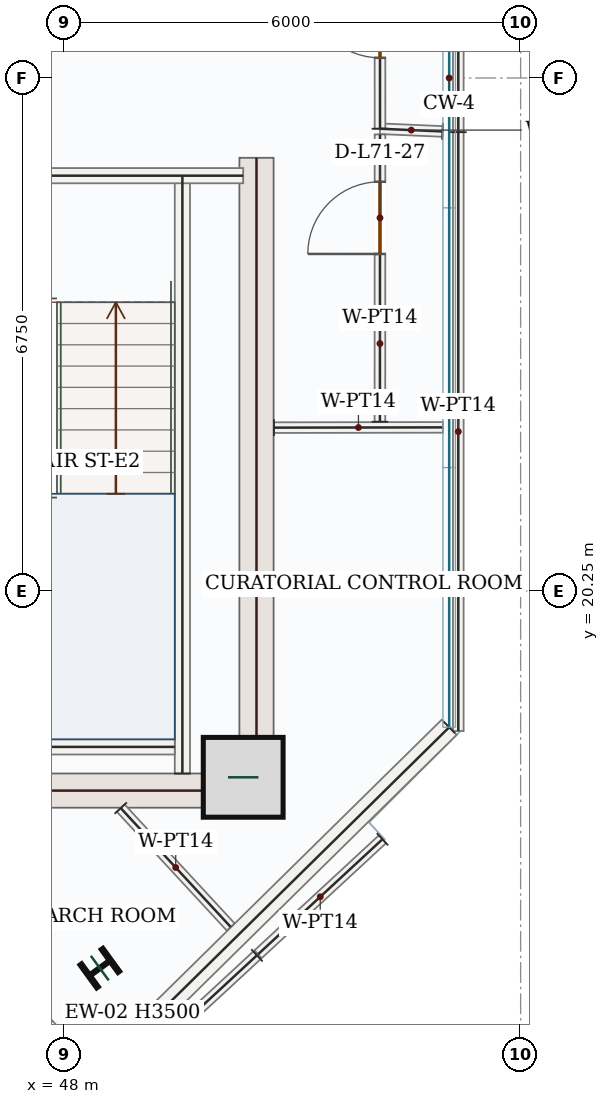
"""IFC4 building model, lengths in metres.
Left out: names, types, materials, properties, quantities, classifications, styles, units other than length and angle.
Written with IfcOpenShell. Run it as: python <this file> out.ifc"""

import sys

from ifc_helpers import new_model, si_unit, direction, frame, frame_2d, origin, origin_2d, place, context, subcontext, project, spatial, rectangle, i_section, extrude, source, transform, mapped, element, fill, save


model = new_model("IFC4")
c1 = context("Model", 3, precision=1e-05, world=origin(), true_north=direction((0.0, 1.0)))
c2 = subcontext(c1, "Body", "Model", "MODEL_VIEW")
j1 = project(units=[si_unit("LENGTHUNIT", "METRE"), si_unit("PLANEANGLEUNIT", "RADIAN")], contexts=[c1])
p1 = place(None, origin())
s1 = spatial("IfcSite", under=j1, at=p1, CompositionType="ELEMENT")
p2 = place(p1, origin())
s2 = spatial("IfcBuilding", under=s1, at=p2, CompositionType="ELEMENT")
p3 = place(p2, frame((0.0, 0.0, 295.35)))
s3 = spatial("IfcBuildingStorey", under=s2, at=p3, CompositionType="ELEMENT", Elevation=295.35)
m1 = source(origin(), c2, "Body", "SweptSolid", [
    extrude(rectangle(XDim=8.55, YDim=0.45, at=frame_2d((4.275, 0.0))), origin(), (0.0, 0.0, 1.0), 3.5),
])
p4 = place(p3, frame((50.525, 17.4, 0.0), z_axis=(0.0, 0.0, 1.0), x_axis=(0.0, 1.0, 0.0)))
e1 = element("IfcWall", 1, at=p4, inside=s3, PredefinedType="SHEAR", context=c2, shape_type="MappedRepresentation", body=[
    mapped(m1, transform((0.0, 0.0, 0.0), x_axis=(1.0, 0.0, 0.0), y_axis=(0.0, 1.0, 0.0), z_axis=(0.0, 0.0, 1.0), scale=1.0)),
])
m2 = source(origin(), c2, "Body", "SweptSolid", [
    extrude(rectangle(XDim=7.1, YDim=0.45, at=frame_2d((3.55, 0.0))), origin(), (0.0, 0.0, 1.0), 3.5),
])
p5 = place(p3, frame((43.2, 17.625, 0.0), z_axis=(0.0, 0.0, 1.0), x_axis=(1.0, 0.0, 0.0)))
e2 = element("IfcWall", 2, at=p5, inside=s3, PredefinedType="SHEAR", context=c2, shape_type="MappedRepresentation", body=[
    mapped(m2, transform((0.0, 0.0, 0.0), x_axis=(1.0, 0.0, 0.0), y_axis=(0.0, 1.0, 0.0), z_axis=(0.0, 0.0, 1.0), scale=1.0)),
])
m3 = source(origin(), c2, "Body", "SweptSolid", [
    extrude(rectangle(XDim=1.05, YDim=1.05, at=origin_2d()), origin(), (0.0, 0.0, 1.0), 3.75),
])
p6 = place(p3, frame((50.35, 17.8, 0.0), z_axis=(0.0, 0.0, 1.0), x_axis=(1.0, 0.0, 0.0)))
e3 = element("IfcColumn", 3, at=p6, inside=s3, PredefinedType="COLUMN", context=c2, shape_type="MappedRepresentation", body=[
    mapped(m3, transform((0.0, 0.0, 0.0), x_axis=(1.0, 0.0, 0.0), y_axis=(0.0, 1.0, 0.0), z_axis=(0.0, 0.0, 1.0), scale=1.0)),
])
m4 = source(origin(), c2, "Body", "SweptSolid", [
    extrude(i_section(OverallWidth=0.374, OverallDepth=0.372, WebThickness=0.016, FlangeThickness=0.026, FilletRadius=0.018, at=origin_2d()), origin(), (0.0, 0.0, 1.0), 3.75),
])
p7 = place(p3, frame((48.464, 15.289, 0.0), z_axis=(0.0, 0.0, 1.0), x_axis=(-0.587785252292, 0.809016994375, 0.0)))
e4 = element("IfcColumn", 4, at=p7, inside=s3, PredefinedType="COLUMN", context=c2, shape_type="MappedRepresentation", body=[
    mapped(m4, transform((0.0, 0.0, 0.0), x_axis=(1.0, 0.0, 0.0), y_axis=(0.0, 1.0, 0.0), z_axis=(0.0, 0.0, 1.0), scale=1.0)),
])
m5 = source(origin(), c2, "Body", "SweptSolid", [
    extrude(rectangle(XDim=11.69, YDim=0.28, at=frame_2d((5.845, 0.0))), origin(), (0.0, 0.0, 1.0), 3.5),
])
p8 = place(p3, frame((53.06, 18.458, 0.0), z_axis=(0.0, 0.0, 1.0), x_axis=(-0.712557502542, -0.701613715353, 0.0)))
e5 = element("IfcWall", 5, at=p8, inside=s3, PredefinedType="SOLIDWALL", context=c2, shape_type="MappedRepresentation", body=[
    mapped(m5, transform((0.0, 0.0, 0.0), x_axis=(1.0, 0.0, 0.0), y_axis=(0.0, 1.0, 0.0), z_axis=(0.0, 0.0, 1.0), scale=1.0)),
])
m6 = source(origin(), c2, "Body", "SweptSolid", [
    extrude(rectangle(XDim=7.87, YDim=0.2, at=frame_2d((3.935, 0.0))), origin(), (0.0, 0.0, 1.0), 3.5),
])
p9 = place(p3, frame((49.55, 17.85, 0.0), z_axis=(0.0, 0.0, 1.0), x_axis=(0.0, 1.0, 0.0)))
e6 = element("IfcWall", 6, at=p9, inside=s3, PredefinedType="SOLIDWALL", context=c2, shape_type="MappedRepresentation", body=[
    mapped(m6, transform((0.0, 0.0, 0.0), x_axis=(1.0, 0.0, 0.0), y_axis=(0.0, 1.0, 0.0), z_axis=(0.0, 0.0, 1.0), scale=1.0)),
])
m7 = source(origin(), c2, "Body", "SweptSolid", [
    extrude(rectangle(XDim=4.25, YDim=0.2, at=frame_2d((2.125, 0.0))), origin(), (0.0, 0.0, 1.0), 3.5),
])
p10 = place(p3, frame((46.1, 25.715, 0.0), z_axis=(0.0, 0.0, 1.0), x_axis=(1.0, 0.0, 0.0)))
e7 = element("IfcWall", 7, at=p10, inside=s3, PredefinedType="SOLIDWALL", context=c2, shape_type="MappedRepresentation", body=[
    mapped(m7, transform((0.0, 0.0, 0.0), x_axis=(1.0, 0.0, 0.0), y_axis=(0.0, 1.0, 0.0), z_axis=(0.0, 0.0, 1.0), scale=1.0)),
])
m8 = source(origin(), c2, "Body", "SweptSolid", [
    extrude(rectangle(XDim=3.25, YDim=0.2, at=frame_2d((1.625, 0.0))), origin(), (0.0, 0.0, 1.0), 3.5),
])
p11 = place(p3, frame((46.2, 18.2, 0.0), z_axis=(0.0, 0.0, 1.0), x_axis=(1.0, 0.0, 0.0)))
e8 = element("IfcWall", 8, at=p11, inside=s3, PredefinedType="SOLIDWALL", context=c2, shape_type="MappedRepresentation", body=[
    mapped(m8, transform((0.0, 0.0, 0.0), x_axis=(1.0, 0.0, 0.0), y_axis=(0.0, 1.0, 0.0), z_axis=(0.0, 0.0, 1.0), scale=1.0)),
])
p12 = place(p3, frame((48.311, 13.985, 0.0), z_axis=(0.0, 0.0, 1.0), x_axis=(-0.679002327249, 0.73413611789, 0.0)))
e9 = element("IfcWall", 9, at=p12, inside=s3, PredefinedType="PARTITIONING", context=c2, shape_type="SweptSolid", body=[
    extrude(rectangle(XDim=4.645, YDim=0.14, at=frame_2d((2.323, 0.0))), origin(), (0.0, 0.0, 1.0), 3.5),
])
p13 = place(p12, frame((2.882, 0.0, 0.0)))
e10 = element("IfcOpeningElement", 10, at=p13, cuts=e9, PredefinedType="OPENING", context=c2, shape_type="SweptSolid", body=[
    extrude(rectangle(XDim=0.95, YDim=2.15, at=frame_2d((0.475, 1.075))), frame((0.0, 0.08, 0.0), z_axis=(0.0, -1.0, 0.0), x_axis=(1.0, 0.0, 0.0)), (0.0, 0.0, 1.0), 0.16),
])
m9 = source(origin(), c2, "Body", "SweptSolid", [
    extrude(rectangle(XDim=2.13, YDim=0.14, at=frame_2d((1.065, 0.0))), origin(), (0.0, 0.0, 1.0), 3.5),
])
p14 = place(p3, frame((48.739, 17.395, 0.0), z_axis=(0.0, 0.0, 1.0), x_axis=(0.678946242809, -0.734187986401, 0.0)))
e11 = element("IfcWall", 11, at=p14, inside=s3, PredefinedType="PARTITIONING", context=c2, shape_type="MappedRepresentation", body=[
    mapped(m9, transform((0.0, 0.0, 0.0), x_axis=(1.0, 0.0, 0.0), y_axis=(0.0, 1.0, 0.0), z_axis=(0.0, 0.0, 1.0), scale=1.0)),
])
m10 = source(origin(), c2, "Body", "SweptSolid", [
    extrude(rectangle(XDim=2.63, YDim=0.14, at=frame_2d((1.315, 0.0))), origin(), (0.0, 0.0, 1.0), 3.5),
])
p15 = place(p3, frame((50.531, 15.458, 0.0), z_axis=(0.0, 0.0, 1.0), x_axis=(-0.73409481217, -0.679046984196, 0.0)))
e12 = element("IfcWall", 12, at=p15, inside=s3, PredefinedType="PARTITIONING", context=c2, shape_type="MappedRepresentation", body=[
    mapped(m10, transform((0.0, 0.0, 0.0), x_axis=(1.0, 0.0, 0.0), y_axis=(0.0, 1.0, 0.0), z_axis=(0.0, 0.0, 1.0), scale=1.0)),
])
m11 = source(origin(), c2, "Body", "SweptSolid", [
    extrude(rectangle(XDim=9.304, YDim=0.14, at=frame_2d((4.652, 0.0))), origin(), (0.0, 0.0, 1.0), 3.5),
])
p16 = place(p3, frame((53.18, 35.592, 0.0), z_axis=(0.0, 0.0, 1.0), x_axis=(0.0, -1.0, 0.0)))
e13 = element("IfcWall", 13, at=p16, inside=s3, PredefinedType="PARTITIONING", context=c2, shape_type="MappedRepresentation", body=[
    mapped(m11, transform((0.0, 0.0, 0.0), x_axis=(1.0, 0.0, 0.0), y_axis=(0.0, 1.0, 0.0), z_axis=(0.0, 0.0, 1.0), scale=1.0)),
])
m12 = source(origin(), c2, "Body", "SweptSolid", [
    extrude(rectangle(XDim=0.823, YDim=0.14, at=frame_2d((0.412, 0.0))), origin(), (0.0, 0.0, 1.0), 3.5),
])
p17 = place(p3, frame((52.972, 26.297, 0.0), z_axis=(0.0, 0.0, 1.0), x_axis=(-0.999049432265, 0.043591649315, 0.0)))
e14 = element("IfcWall", 14, at=p17, inside=s3, PredefinedType="PARTITIONING", context=c2, shape_type="MappedRepresentation", body=[
    mapped(m12, transform((0.0, 0.0, 0.0), x_axis=(1.0, 0.0, 0.0), y_axis=(0.0, 1.0, 0.0), z_axis=(0.0, 0.0, 1.0), scale=1.0)),
])
p18 = place(p3, frame((52.15, 26.333, 0.0), z_axis=(0.0, 0.0, 1.0), x_axis=(-0.000188111359, 0.999999982307, 0.0)))
e15 = element("IfcWall", 15, at=p18, inside=s3, PredefinedType="PARTITIONING", context=c2, shape_type="SweptSolid", body=[
    extrude(rectangle(XDim=5.191, YDim=0.14, at=frame_2d((2.596, 0.0))), origin(), (0.0, 0.0, 1.0), 3.5),
])
p19 = place(p18, frame((0.933, 0.0, 0.0)))
e16 = element("IfcOpeningElement", 16, at=p19, cuts=e15, PredefinedType="OPENING", context=c2, shape_type="SweptSolid", body=[
    extrude(rectangle(XDim=0.95, YDim=2.15, at=frame_2d((0.475, 1.075))), frame((0.0, 0.08, 0.0), z_axis=(0.0, -1.0, 0.0), x_axis=(1.0, 0.0, 0.0)), (0.0, 0.0, 1.0), 0.16),
])
m13 = source(origin(), c2, "Body", "SweptSolid", [
    extrude(rectangle(XDim=2.223, YDim=0.14, at=frame_2d((1.111, 0.0))), origin(), (0.0, 0.0, 1.0), 3.5),
])
p20 = place(p3, frame((50.755, 22.4, 0.0), z_axis=(0.0, 0.0, 1.0), x_axis=(0.99999881761, 0.00153778377, 0.0)))
e17 = element("IfcWall", 17, at=p20, inside=s3, PredefinedType="PARTITIONING", context=c2, shape_type="MappedRepresentation", body=[
    mapped(m13, transform((0.0, 0.0, 0.0), x_axis=(1.0, 0.0, 0.0), y_axis=(0.0, 1.0, 0.0), z_axis=(0.0, 0.0, 1.0), scale=1.0)),
])
p21 = place(p3, frame((52.149, 22.477, 0.0), z_axis=(0.0, 0.0, 1.0), x_axis=(0.000322913959, 0.999999947863, 0.0)))
e18 = element("IfcWall", 18, at=p21, inside=s3, PredefinedType="PARTITIONING", context=c2, shape_type="SweptSolid", body=[
    extrude(rectangle(XDim=3.78, YDim=0.14, at=frame_2d((1.89, 0.0))), origin(), (0.0, 0.0, 1.0), 3.5),
])
p22 = place(p21, frame((2.208, 0.0, 0.0)))
e19 = element("IfcOpeningElement", 19, at=p22, cuts=e18, PredefinedType="OPENING", context=c2, shape_type="SweptSolid", body=[
    extrude(rectangle(XDim=0.95, YDim=2.15, at=frame_2d((0.475, 1.075))), frame((0.0, 0.08, 0.0), z_axis=(0.0, -1.0, 0.0), x_axis=(1.0, 0.0, 0.0)), (0.0, 0.0, 1.0), 0.16),
])
m14 = source(origin(), c2, "Body", "SweptSolid", [
    extrude(rectangle(XDim=7.879, YDim=0.14, at=frame_2d((3.94, 0.0))), origin(), (0.0, 0.0, 1.0), 3.5),
])
p23 = place(p3, frame((53.18, 26.288, 0.0), z_axis=(0.0, 0.0, 1.0), x_axis=(0.0, -1.0, 0.0)))
e20 = element("IfcWall", 20, at=p23, inside=s3, PredefinedType="PARTITIONING", context=c2, shape_type="MappedRepresentation", body=[
    mapped(m14, transform((0.0, 0.0, 0.0), x_axis=(1.0, 0.0, 0.0), y_axis=(0.0, 1.0, 0.0), z_axis=(0.0, 0.0, 1.0), scale=1.0)),
])
m15 = source(origin(), c2, "Body", "SweptSolid", [
    extrude(rectangle(XDim=2.229, YDim=0.14, at=frame_2d((1.115, 0.0))), origin(), (0.0, 0.0, 1.0), 3.5),
])
p24 = place(p3, frame((52.182, 16.985, 0.0), z_axis=(0.0, 0.0, 1.0), x_axis=(-0.734110356631, -0.679030179217, 0.0)))
e21 = element("IfcWall", 21, at=p24, inside=s3, PredefinedType="PARTITIONING", context=c2, shape_type="MappedRepresentation", body=[
    mapped(m15, transform((0.0, 0.0, 0.0), x_axis=(1.0, 0.0, 0.0), y_axis=(0.0, 1.0, 0.0), z_axis=(0.0, 0.0, 1.0), scale=1.0)),
])
m16 = source(origin(), c2, "Body", "SweptSolid", [
    extrude(rectangle(XDim=0.95, YDim=2.15, at=frame_2d((0.475, 1.075))), frame((0.0, 0.025, 0.0), z_axis=(0.0, -1.0, 0.0), x_axis=(1.0, 0.0, 0.0)), (0.0, 0.0, 1.0), 0.05),
])
p25 = place(p19, origin())
e22 = element("IfcDoor", 22, at=p25, inside=s3, OperationType="SINGLE_SWING_RIGHT", PredefinedType="DOOR", context=c2, shape_type="MappedRepresentation", body=[
    mapped(m16, transform((0.0, 0.0, 0.0), x_axis=(1.0, 0.0, 0.0), y_axis=(0.0, 1.0, 0.0), z_axis=(0.0, 0.0, 1.0), scale=1.0)),
])
fill(e16, e22)
p26 = place(p22, origin())
e23 = element("IfcDoor", 23, at=p26, inside=s3, OperationType="SINGLE_SWING_LEFT", PredefinedType="DOOR", context=c2, shape_type="MappedRepresentation", body=[
    mapped(m16, transform((0.0, 0.0, 0.0), x_axis=(1.0, 0.0, 0.0), y_axis=(0.0, 1.0, 0.0), z_axis=(0.0, 0.0, 1.0), scale=1.0)),
])
fill(e19, e23)
save(model, sys.argv[1])
